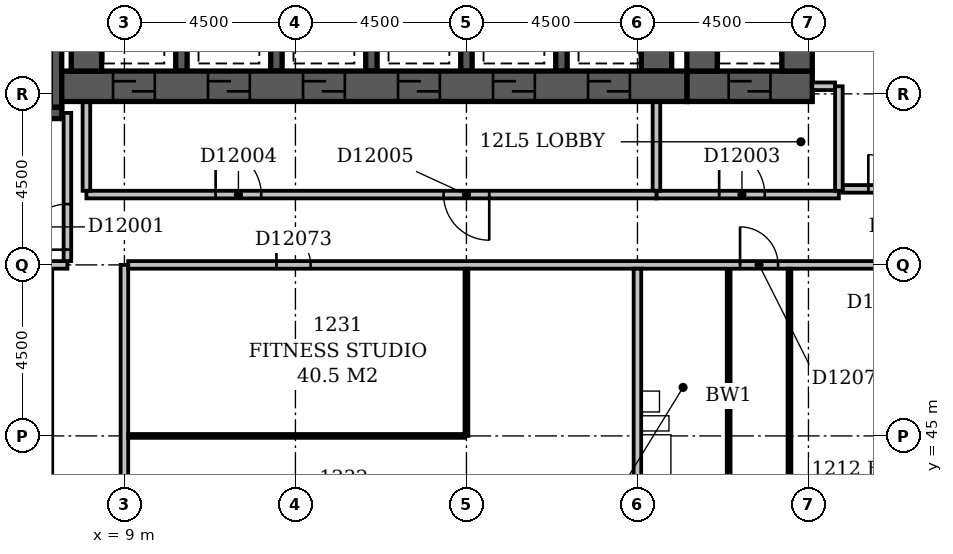
"""IFC4 building model, lengths in metres.
Left out: names, types, materials, properties, quantities, classifications, styles, units other than length and angle.
Written with IfcOpenShell. Run it as: python <this file> out.ifc"""

import sys

from ifc_helpers import new_model, si_unit, direction, frame, frame_2d, origin, place, context, subcontext, project, spatial, rectangle, extrude, element, fill, save


model = new_model("IFC4")
c1 = context("Model", 3, precision=1e-05, world=origin(), true_north=direction((0.0, 1.0)))
c2 = subcontext(c1, "Body", "Model", "MODEL_VIEW")
j1 = project(units=[si_unit("LENGTHUNIT", "METRE"), si_unit("PLANEANGLEUNIT", "RADIAN")], contexts=[c1])
p1 = place(None, origin())
s1 = spatial("IfcSite", under=j1, at=p1, CompositionType="ELEMENT")
p2 = place(p1, origin())
s2 = spatial("IfcBuilding", under=s1, at=p2, CompositionType="ELEMENT")
p3 = place(p2, frame((0.0, 0.0, 54.2)))
s3 = spatial("IfcBuildingStorey", under=s2, at=p3, CompositionType="ELEMENT", Elevation=54.2)
p4 = place(p3, frame((0.35, 53.5, -0.3), z_axis=(0.0, 0.0, 1.0), x_axis=(1.0, 0.0, 0.0)))
e1 = element("IfcWall", 1, at=p4, inside=s3, PredefinedType="SHEAR", context=c2, shape_type="SweptSolid", body=[
    extrude(rectangle(XDim=7.0, YDim=0.3, at=frame_2d((3.5, 0.0))), origin(), (0.0, 0.0, 1.0), 3.6),
])
p5 = place(p4, frame((5.58, 0.0, 0.3)))
e2 = element("IfcOpeningElement", 2, at=p5, cuts=e1, PredefinedType="OPENING", context=c2, shape_type="SweptSolid", body=[
    extrude(rectangle(XDim=1.1, YDim=2.1, at=frame_2d((0.55, 1.05))), frame((0.0, 0.162, 0.0), z_axis=(0.0, -1.0, 0.0), x_axis=(1.0, 0.0, 0.0)), (0.0, 0.0, 1.0), 0.324),
])
p6 = place(p3, frame((7.2, 53.65, -0.3), z_axis=(0.0, 0.0, 1.0), x_axis=(0.0, 1.0, 0.0)))
e3 = element("IfcWall", 3, at=p6, inside=s3, PredefinedType="SHEAR", context=c2, shape_type="SweptSolid", body=[
    extrude(rectangle(XDim=4.2, YDim=0.3, at=frame_2d((2.1, 0.0))), origin(), (0.0, 0.0, 1.0), 3.6),
])
p7 = place(p3, frame((7.35, 54.2, -0.3), z_axis=(0.0, 0.0, 1.0), x_axis=(1.0, 0.0, 0.0)))
e4 = element("IfcWall", 4, at=p7, inside=s3, PredefinedType="SHEAR", context=c2, shape_type="SweptSolid", body=[
    extrude(rectangle(XDim=16.45, YDim=0.8, at=frame_2d((8.225, 0.0))), origin(), (0.0, 0.0, 1.0), 3.6),
])
p8 = place(p7, frame((1.35, 0.0, 0.3)))
e5 = element("IfcOpeningElement", 5, at=p8, cuts=e4, PredefinedType="OPENING", context=c2, shape_type="SweptSolid", body=[
    extrude(rectangle(XDim=1.1, YDim=2.1, at=frame_2d((0.55, 1.05))), frame((0.0, 0.412, 0.0), z_axis=(0.0, -1.0, 0.0), x_axis=(1.0, 0.0, 0.0)), (0.0, 0.0, 1.0), 0.824),
])
p9 = place(p7, frame((3.85, 0.0, 0.3)))
e6 = element("IfcOpeningElement", 6, at=p9, cuts=e4, PredefinedType="OPENING", context=c2, shape_type="SweptSolid", body=[
    extrude(rectangle(XDim=1.1, YDim=2.1, at=frame_2d((0.55, 1.05))), frame((0.0, 0.412, 0.0), z_axis=(0.0, -1.0, 0.0), x_axis=(1.0, 0.0, 0.0)), (0.0, 0.0, 1.0), 0.824),
])
p10 = place(p7, frame((6.35, 0.0, 0.3)))
e7 = element("IfcOpeningElement", 7, at=p10, cuts=e4, PredefinedType="OPENING", context=c2, shape_type="SweptSolid", body=[
    extrude(rectangle(XDim=1.1, YDim=2.1, at=frame_2d((0.55, 1.05))), frame((0.0, 0.412, 0.0), z_axis=(0.0, -1.0, 0.0), x_axis=(1.0, 0.0, 0.0)), (0.0, 0.0, 1.0), 0.824),
])
p11 = place(p7, frame((8.85, 0.0, 0.3)))
e8 = element("IfcOpeningElement", 8, at=p11, cuts=e4, PredefinedType="OPENING", context=c2, shape_type="SweptSolid", body=[
    extrude(rectangle(XDim=1.1, YDim=2.1, at=frame_2d((0.55, 1.05))), frame((0.0, 0.412, 0.0), z_axis=(0.0, -1.0, 0.0), x_axis=(1.0, 0.0, 0.0)), (0.0, 0.0, 1.0), 0.824),
])
p12 = place(p7, frame((11.35, 0.0, 0.3)))
e9 = element("IfcOpeningElement", 9, at=p12, cuts=e4, PredefinedType="OPENING", context=c2, shape_type="SweptSolid", body=[
    extrude(rectangle(XDim=1.1, YDim=2.1, at=frame_2d((0.55, 1.05))), frame((0.0, 0.412, 0.0), z_axis=(0.0, -1.0, 0.0), x_axis=(1.0, 0.0, 0.0)), (0.0, 0.0, 1.0), 0.824),
])
p13 = place(p7, frame((13.85, 0.0, 0.3)))
e10 = element("IfcOpeningElement", 10, at=p13, cuts=e4, PredefinedType="OPENING", context=c2, shape_type="SweptSolid", body=[
    extrude(rectangle(XDim=1.1, YDim=2.1, at=frame_2d((0.55, 1.05))), frame((0.0, 0.412, 0.0), z_axis=(0.0, -1.0, 0.0), x_axis=(1.0, 0.0, 0.0)), (0.0, 0.0, 1.0), 0.824),
])
p14 = place(p3, frame((8.0, 54.6, -0.3), z_axis=(0.0, 0.0, 1.0), x_axis=(0.0, 1.0, 0.0)))
e11 = element("IfcWall", 11, at=p14, inside=s3, PredefinedType="SHEAR", context=c2, shape_type="SweptSolid", body=[
    extrude(rectangle(XDim=3.0, YDim=0.8, at=frame_2d((1.5, 0.0))), origin(), (0.0, 0.0, 1.0), 3.6),
])
for number, where, z_axis, x_axis in (
    (12, (10.5, 54.6, -0.3), (0.0, 0.0, 1.0), (0.0, 1.0, 0.0)),
    (13, (13.0, 54.6, -0.3), (0.0, 0.0, 1.0), (0.0, 1.0, 0.0)),
    (14, (15.5, 54.6, -0.3), (0.0, 0.0, 1.0), (0.0, 1.0, 0.0)),
    (15, (18.0, 54.6, -0.3), (0.0, 0.0, 1.0), (0.0, 1.0, 0.0)),
    (16, (20.5, 54.6, -0.3), (0.0, 0.0, 1.0), (0.0, 1.0, 0.0)),
):
    element("IfcWall", number, at=place(p3, frame(where, z_axis=z_axis, x_axis=x_axis)), inside=s3, PredefinedType="SHEAR", context=c2, shape_type="SweptSolid", body=[
        extrude(rectangle(XDim=3.0, YDim=0.3, at=frame_2d((1.5, 0.0))), origin(), (0.0, 0.0, 1.0), 3.6),
    ])
p15 = place(p3, frame((23.0, 54.6, -0.3), z_axis=(0.0, 0.0, 1.0), x_axis=(0.0, 1.0, 0.0)))
e17 = element("IfcWall", 17, at=p15, inside=s3, PredefinedType="SHEAR", context=c2, shape_type="SweptSolid", body=[
    extrude(rectangle(XDim=3.0, YDim=0.8, at=frame_2d((1.5, 0.0))), origin(), (0.0, 0.0, 1.0), 3.6),
])
p16 = place(p3, frame((23.8, 54.2, -0.3), z_axis=(0.0, 0.0, 1.0), x_axis=(1.0, 0.0, 0.0)))
e18 = element("IfcWall", 18, at=p16, inside=s3, PredefinedType="SHEAR", context=c2, shape_type="SweptSolid", body=[
    extrude(rectangle(XDim=3.3, YDim=0.8, at=frame_2d((1.65, 0.0))), origin(), (0.0, 0.0, 1.0), 3.6),
])
p17 = place(p16, frame((1.1, 0.0, 0.3)))
e19 = element("IfcOpeningElement", 19, at=p17, cuts=e18, PredefinedType="OPENING", context=c2, shape_type="SweptSolid", body=[
    extrude(rectangle(XDim=1.1, YDim=2.1, at=frame_2d((0.55, 1.05))), frame((0.0, 0.412, 0.0), z_axis=(0.0, -1.0, 0.0), x_axis=(1.0, 0.0, 0.0)), (0.0, 0.0, 1.0), 0.824),
])
for number, where, z_axis, x_axis in (
    (20, (24.2, 54.6, -0.3), (0.0, 0.0, 1.0), (0.0, 1.0, 0.0)),
    (21, (26.7, 54.6, -0.3), (0.0, 0.0, 1.0), (0.0, 1.0, 0.0)),
):
    element("IfcWall", number, at=place(p3, frame(where, z_axis=z_axis, x_axis=x_axis)), inside=s3, PredefinedType="SHEAR", context=c2, shape_type="SweptSolid", body=[
        extrude(rectangle(XDim=3.0, YDim=0.8, at=frame_2d((1.5, 0.0))), origin(), (0.0, 0.0, 1.0), 3.6),
    ])
p18 = place(p3, frame((8.0, 51.35, 0.0), z_axis=(0.0, 0.0, 1.0), x_axis=(1.0, 0.0, 0.0)))
e22 = element("IfcWall", 22, at=p18, inside=s3, PredefinedType="PARTITIONING", context=c2, shape_type="SweptSolid", body=[
    extrude(rectangle(XDim=15.0, YDim=0.2, at=frame_2d((7.5, 0.0))), origin(), (0.0, 0.0, 1.0), 3.3),
])
p19 = place(p18, frame((3.4, 0.0, 0.0)))
e23 = element("IfcOpeningElement", 23, at=p19, cuts=e22, PredefinedType="OPENING", context=c2, shape_type="SweptSolid", body=[
    extrude(rectangle(XDim=1.2, YDim=2.1, at=frame_2d((0.6, 1.05))), frame((0.0, 0.112, 0.0), z_axis=(0.0, -1.0, 0.0), x_axis=(1.0, 0.0, 0.0)), (0.0, 0.0, 1.0), 0.224),
])
p20 = place(p18, frame((9.4, 0.0, 0.0)))
e24 = element("IfcOpeningElement", 24, at=p20, cuts=e22, PredefinedType="OPENING", context=c2, shape_type="SweptSolid", body=[
    extrude(rectangle(XDim=1.2, YDim=2.1, at=frame_2d((0.6, 1.05))), frame((0.0, 0.112, 0.0), z_axis=(0.0, -1.0, 0.0), x_axis=(1.0, 0.0, 0.0)), (0.0, 0.0, 1.0), 0.224),
])
for number, where, z_axis, x_axis in (
    (25, (23.0, 51.45, 0.0), (0.0, 0.0, 1.0), (0.0, 1.0, 0.0)),
    (26, (8.0, 51.45, 0.0), (0.0, 0.0, 1.0), (0.0, 1.0, 0.0)),
):
    element("IfcWall", number, at=place(p3, frame(where, z_axis=z_axis, x_axis=x_axis)), inside=s3, PredefinedType="PARTITIONING", context=c2, shape_type="SweptSolid", body=[
        extrude(rectangle(XDim=2.33, YDim=0.2, at=frame_2d((1.165, 0.0))), origin(), (0.0, 0.0, 1.0), 3.3),
    ])
p21 = place(p3, frame((23.0, 51.35, 0.0), z_axis=(0.0, 0.0, 1.0), x_axis=(1.0, 0.0, 0.0)))
e27 = element("IfcWall", 27, at=p21, inside=s3, PredefinedType="PARTITIONING", context=c2, shape_type="SweptSolid", body=[
    extrude(rectangle(XDim=4.8, YDim=0.2, at=frame_2d((2.4, 0.0))), origin(), (0.0, 0.0, 1.0), 3.3),
])
p22 = place(p21, frame((1.65, 0.0, 0.0)))
e28 = element("IfcOpeningElement", 28, at=p22, cuts=e27, PredefinedType="OPENING", context=c2, shape_type="SweptSolid", body=[
    extrude(rectangle(XDim=1.2, YDim=2.1, at=frame_2d((0.6, 1.05))), frame((0.0, 0.112, 0.0), z_axis=(0.0, -1.0, 0.0), x_axis=(1.0, 0.0, 0.0)), (0.0, 0.0, 1.0), 0.224),
])
p23 = place(p3, frame((27.8, 51.45, 0.0), z_axis=(0.0, 0.0, 1.0), x_axis=(0.0, 1.0, 0.0)))
e29 = element("IfcWall", 29, at=p23, inside=s3, PredefinedType="PARTITIONING", context=c2, shape_type="SweptSolid", body=[
    extrude(rectangle(XDim=2.75, YDim=0.2, at=frame_2d((1.375, 0.0))), origin(), (0.0, 0.0, 1.0), 3.3),
])
p24 = place(p3, frame((27.1, 54.2, 0.0), z_axis=(0.0, 0.0, 1.0), x_axis=(1.0, 0.0, 0.0)))
e30 = element("IfcWall", 30, at=p24, inside=s3, PredefinedType="PARTITIONING", context=c2, shape_type="SweptSolid", body=[
    extrude(rectangle(XDim=0.6, YDim=0.2, at=frame_2d((0.3, 0.0))), origin(), (0.0, 0.0, 1.0), 3.3),
])
p25 = place(p3, frame((0.5, 49.5, 0.0), z_axis=(0.0, 0.0, 1.0), x_axis=(1.0, 0.0, 0.0)))
e31 = element("IfcWall", 31, at=p25, inside=s3, PredefinedType="PARTITIONING", context=c2, shape_type="SweptSolid", body=[
    extrude(rectangle(XDim=7.0, YDim=0.2, at=frame_2d((3.5, 0.0))), origin(), (0.0, 0.0, 1.0), 3.3),
])
p26 = place(p3, frame((7.5, 49.6, 0.0), z_axis=(0.0, 0.0, 1.0), x_axis=(0.0, 1.0, 0.0)))
e32 = element("IfcWall", 32, at=p26, inside=s3, PredefinedType="PARTITIONING", context=c2, shape_type="SweptSolid", body=[
    extrude(rectangle(XDim=3.9, YDim=0.2, at=frame_2d((1.95, 0.0))), origin(), (0.0, 0.0, 1.0), 3.3),
])
p27 = place(p26, frame((0.3, 0.0, 0.0)))
e33 = element("IfcOpeningElement", 33, at=p27, cuts=e32, PredefinedType="OPENING", context=c2, shape_type="SweptSolid", body=[
    extrude(rectangle(XDim=1.2, YDim=2.1, at=frame_2d((0.6, 1.05))), frame((0.0, 0.112, 0.0), z_axis=(0.0, -1.0, 0.0), x_axis=(1.0, 0.0, 0.0)), (0.0, 0.0, 1.0), 0.224),
])
p28 = place(p3, frame((9.0, 5.0, 0.0), z_axis=(0.0, 0.0, 1.0), x_axis=(0.0, 1.0, 0.0)))
e34 = element("IfcWall", 34, at=p28, inside=s3, PredefinedType="PARTITIONING", context=c2, shape_type="SweptSolid", body=[
    extrude(rectangle(XDim=44.5, YDim=0.2, at=frame_2d((22.25, 0.0))), origin(), (0.0, 0.0, 1.0), 3.3),
])
p29 = place(p28, frame((28.45, 0.0, 0.0)))
e35 = element("IfcOpeningElement", 35, at=p29, cuts=e34, PredefinedType="OPENING", context=c2, shape_type="SweptSolid", body=[
    extrude(rectangle(XDim=1.0, YDim=2.1, at=frame_2d((0.5, 1.05))), frame((0.0, 0.112, 0.0), z_axis=(0.0, -1.0, 0.0), x_axis=(1.0, 0.0, 0.0)), (0.0, 0.0, 1.0), 0.224),
])
p30 = place(p28, frame((17.8, 0.0, 0.0)))
e36 = element("IfcOpeningElement", 36, at=p30, cuts=e34, PredefinedType="OPENING", context=c2, shape_type="SweptSolid", body=[
    extrude(rectangle(XDim=1.0, YDim=2.1, at=frame_2d((0.5, 1.05))), frame((0.0, 0.112, 0.0), z_axis=(0.0, -1.0, 0.0), x_axis=(1.0, 0.0, 0.0)), (0.0, 0.0, 1.0), 0.224),
])
p31 = place(p28, frame((14.55, 0.0, 0.0)))
e37 = element("IfcOpeningElement", 37, at=p31, cuts=e34, PredefinedType="OPENING", context=c2, shape_type="SweptSolid", body=[
    extrude(rectangle(XDim=1.0, YDim=2.1, at=frame_2d((0.5, 1.05))), frame((0.0, 0.112, 0.0), z_axis=(0.0, -1.0, 0.0), x_axis=(1.0, 0.0, 0.0)), (0.0, 0.0, 1.0), 0.224),
])
p32 = place(p28, frame((11.7, 0.0, 0.0)))
e38 = element("IfcOpeningElement", 38, at=p32, cuts=e34, PredefinedType="OPENING", context=c2, shape_type="SweptSolid", body=[
    extrude(rectangle(XDim=1.0, YDim=2.1, at=frame_2d((0.5, 1.05))), frame((0.0, 0.112, 0.0), z_axis=(0.0, -1.0, 0.0), x_axis=(1.0, 0.0, 0.0)), (0.0, 0.0, 1.0), 0.224),
])
p33 = place(p28, frame((35.0, 0.0, 0.0)))
e39 = element("IfcOpeningElement", 39, at=p33, cuts=e34, PredefinedType="OPENING", context=c2, shape_type="SweptSolid", body=[
    extrude(rectangle(XDim=0.9, YDim=2.1, at=frame_2d((0.45, 1.05))), frame((0.0, 0.112, 0.0), z_axis=(0.0, -1.0, 0.0), x_axis=(1.0, 0.0, 0.0)), (0.0, 0.0, 1.0), 0.224),
])
p34 = place(p28, frame((1.5, 0.0, 0.0)))
e40 = element("IfcOpeningElement", 40, at=p34, cuts=e34, PredefinedType="OPENING", context=c2, shape_type="SweptSolid", body=[
    extrude(rectangle(XDim=0.9, YDim=2.1, at=frame_2d((0.45, 1.05))), frame((0.0, 0.112, 0.0), z_axis=(0.0, -1.0, 0.0), x_axis=(1.0, 0.0, 0.0)), (0.0, 0.0, 1.0), 0.224),
])
p35 = place(p3, frame((22.5, 36.6, 0.0), z_axis=(0.0, 0.0, 1.0), x_axis=(0.0, 1.0, 0.0)))
e41 = element("IfcWall", 41, at=p35, inside=s3, PredefinedType="PARTITIONING", context=c2, shape_type="SweptSolid", body=[
    extrude(rectangle(XDim=12.8, YDim=0.2, at=frame_2d((6.4, 0.0))), origin(), (0.0, 0.0, 1.0), 3.3),
])
p36 = place(p3, frame((24.9, 42.7, 0.0), z_axis=(0.0, 0.0, 1.0), x_axis=(0.0, 1.0, 0.0)))
e42 = element("IfcWall", 42, at=p36, inside=s3, PredefinedType="PLUMBINGWALL", context=c2, shape_type="SweptSolid", body=[
    extrude(rectangle(XDim=6.7, YDim=0.1, at=frame_2d((3.35, 0.0))), origin(), (0.0, 0.0, 1.0), 3.3),
])
p37 = place(p3, frame((26.5, 42.7, 0.0), z_axis=(0.0, 0.0, 1.0), x_axis=(0.0, 1.0, 0.0)))
e43 = element("IfcWall", 43, at=p37, inside=s3, PredefinedType="PARTITIONING", context=c2, shape_type="SweptSolid", body=[
    extrude(rectangle(XDim=6.7, YDim=0.1, at=frame_2d((3.35, 0.0))), origin(), (0.0, 0.0, 1.0), 2.6),
])
p38 = place(p3, frame((9.1, 45.0, 0.0), z_axis=(0.0, 0.0, 1.0), x_axis=(1.0, 0.0, 0.0)))
e44 = element("IfcWall", 44, at=p38, inside=s3, PredefinedType="PARTITIONING", context=c2, shape_type="SweptSolid", body=[
    extrude(rectangle(XDim=8.85, YDim=0.1, at=frame_2d((4.425, 0.0))), origin(), (0.0, 0.0, 1.0), 3.3),
])
p39 = place(p3, frame((18.0, 45.0, 0.0), z_axis=(0.0, 0.0, 1.0), x_axis=(0.0, 1.0, 0.0)))
e45 = element("IfcWall", 45, at=p39, inside=s3, PredefinedType="PARTITIONING", context=c2, shape_type="SweptSolid", body=[
    extrude(rectangle(XDim=4.4, YDim=0.1, at=frame_2d((2.2, 0.0))), origin(), (0.0, 0.0, 1.0), 3.3),
])
p40 = place(p3, frame((9.1, 49.5, 0.0), z_axis=(0.0, 0.0, 1.0), x_axis=(1.0, 0.0, 0.0)))
e46 = element("IfcWall", 46, at=p40, inside=s3, PredefinedType="PARTITIONING", context=c2, shape_type="SweptSolid", body=[
    extrude(rectangle(XDim=57.8, YDim=0.2, at=frame_2d((28.9, 0.0))), origin(), (0.0, 0.0, 1.0), 3.3),
])
p41 = place(p40, frame((16.1, 0.0, 0.0)))
e47 = element("IfcOpeningElement", 47, at=p41, cuts=e46, PredefinedType="OPENING", context=c2, shape_type="SweptSolid", body=[
    extrude(rectangle(XDim=1.0, YDim=2.1, at=frame_2d((0.5, 1.05))), frame((0.0, 0.112, 0.0), z_axis=(0.0, -1.0, 0.0), x_axis=(1.0, 0.0, 0.0)), (0.0, 0.0, 1.0), 0.224),
])
p42 = place(p40, frame((40.0, 0.0, 0.0)))
e48 = element("IfcOpeningElement", 48, at=p42, cuts=e46, PredefinedType="OPENING", context=c2, shape_type="SweptSolid", body=[
    extrude(rectangle(XDim=1.0, YDim=2.1, at=frame_2d((0.5, 1.05))), frame((0.0, 0.112, 0.0), z_axis=(0.0, -1.0, 0.0), x_axis=(1.0, 0.0, 0.0)), (0.0, 0.0, 1.0), 0.224),
])
p43 = place(p40, frame((45.2, 0.0, 0.0)))
e49 = element("IfcOpeningElement", 49, at=p43, cuts=e46, PredefinedType="OPENING", context=c2, shape_type="SweptSolid", body=[
    extrude(rectangle(XDim=1.0, YDim=2.1, at=frame_2d((0.5, 1.05))), frame((0.0, 0.112, 0.0), z_axis=(0.0, -1.0, 0.0), x_axis=(1.0, 0.0, 0.0)), (0.0, 0.0, 1.0), 0.224),
])
p44 = place(p40, frame((3.9, 0.0, 0.0)))
e50 = element("IfcOpeningElement", 50, at=p44, cuts=e46, PredefinedType="OPENING", context=c2, shape_type="SweptSolid", body=[
    extrude(rectangle(XDim=0.9, YDim=2.1, at=frame_2d((0.45, 1.05))), frame((0.0, 0.112, 0.0), z_axis=(0.0, -1.0, 0.0), x_axis=(1.0, 0.0, 0.0)), (0.0, 0.0, 1.0), 0.224),
])
p45 = place(p3, frame((27.9, 51.5, 0.0), z_axis=(0.0, 0.0, 1.0), x_axis=(1.0, 0.0, 0.0)))
e51 = element("IfcWall", 51, at=p45, inside=s3, PredefinedType="PARTITIONING", context=c2, shape_type="SweptSolid", body=[
    extrude(rectangle(XDim=9.3, YDim=0.2, at=frame_2d((4.65, 0.0))), origin(), (0.0, 0.0, 1.0), 3.3),
])
p46 = place(p45, frame((0.675, 0.0, 0.0)))
e52 = element("IfcOpeningElement", 52, at=p46, cuts=e51, PredefinedType="OPENING", context=c2, shape_type="SweptSolid", body=[
    extrude(rectangle(XDim=0.9, YDim=2.1, at=frame_2d((0.45, 1.05))), frame((0.0, 0.112, 0.0), z_axis=(0.0, -1.0, 0.0), x_axis=(1.0, 0.0, 0.0)), (0.0, 0.0, 1.0), 0.224),
])
p47 = place(p45, frame((3.6, 0.0, 0.0)))
e53 = element("IfcOpeningElement", 53, at=p47, cuts=e51, PredefinedType="OPENING", context=c2, shape_type="SweptSolid", body=[
    extrude(rectangle(XDim=1.0, YDim=2.1, at=frame_2d((0.5, 1.05))), frame((0.0, 0.112, 0.0), z_axis=(0.0, -1.0, 0.0), x_axis=(1.0, 0.0, 0.0)), (0.0, 0.0, 1.0), 0.224),
])
p48 = place(p45, frame((7.125, 0.0, 0.0)))
e54 = element("IfcOpeningElement", 54, at=p48, cuts=e51, PredefinedType="OPENING", context=c2, shape_type="SweptSolid", body=[
    extrude(rectangle(XDim=1.0, YDim=2.1, at=frame_2d((0.5, 1.05))), frame((0.0, 0.112, 0.0), z_axis=(0.0, -1.0, 0.0), x_axis=(1.0, 0.0, 0.0)), (0.0, 0.0, 1.0), 0.224),
])
p49 = place(p27, origin())
e55 = element("IfcDoor", 55, at=p49, inside=s3, OperationType="SINGLE_SWING_LEFT", PredefinedType="DOOR", context=c2, shape_type="SweptSolid", body=[
    extrude(rectangle(XDim=1.2, YDim=2.1, at=frame_2d((0.6, 1.05))), frame((0.0, 0.025, 0.0), z_axis=(0.0, -1.0, 0.0), x_axis=(1.0, 0.0, 0.0)), (0.0, 0.0, 1.0), 0.05),
])
fill(e33, e55)
p50 = place(p22, origin())
e56 = element("IfcDoor", 56, at=p50, inside=s3, OperationType="SINGLE_SWING_LEFT", PredefinedType="DOOR", context=c2, shape_type="SweptSolid", body=[
    extrude(rectangle(XDim=1.2, YDim=2.1, at=frame_2d((0.6, 1.05))), frame((0.0, 0.025, 0.0), z_axis=(0.0, -1.0, 0.0), x_axis=(1.0, 0.0, 0.0)), (0.0, 0.0, 1.0), 0.05),
])
fill(e28, e56)
p51 = place(p17, origin())
e57 = element("IfcDoor", 57, at=p51, inside=s3, OperationType="SLIDING_TO_LEFT", PredefinedType="DOOR", context=c2, shape_type="SweptSolid", body=[
    extrude(rectangle(XDim=1.1, YDim=2.1, at=frame_2d((0.55, 1.05))), frame((0.0, 0.025, 0.0), z_axis=(0.0, -1.0, 0.0), x_axis=(1.0, 0.0, 0.0)), (0.0, 0.0, 1.0), 0.05),
])
fill(e19, e57)
p52 = place(p8, origin())
e58 = element("IfcDoor", 58, at=p52, inside=s3, OperationType="SLIDING_TO_LEFT", PredefinedType="DOOR", context=c2, shape_type="SweptSolid", body=[
    extrude(rectangle(XDim=1.1, YDim=2.1, at=frame_2d((0.55, 1.05))), frame((0.0, 0.025, 0.0), z_axis=(0.0, -1.0, 0.0), x_axis=(1.0, 0.0, 0.0)), (0.0, 0.0, 1.0), 0.05),
])
fill(e5, e58)
p53 = place(p9, origin())
e59 = element("IfcDoor", 59, at=p53, inside=s3, OperationType="SLIDING_TO_LEFT", PredefinedType="DOOR", context=c2, shape_type="SweptSolid", body=[
    extrude(rectangle(XDim=1.1, YDim=2.1, at=frame_2d((0.55, 1.05))), frame((0.0, 0.025, 0.0), z_axis=(0.0, -1.0, 0.0), x_axis=(1.0, 0.0, 0.0)), (0.0, 0.0, 1.0), 0.05),
])
fill(e6, e59)
p54 = place(p10, origin())
e60 = element("IfcDoor", 60, at=p54, inside=s3, OperationType="SLIDING_TO_LEFT", PredefinedType="DOOR", context=c2, shape_type="SweptSolid", body=[
    extrude(rectangle(XDim=1.1, YDim=2.1, at=frame_2d((0.55, 1.05))), frame((0.0, 0.025, 0.0), z_axis=(0.0, -1.0, 0.0), x_axis=(1.0, 0.0, 0.0)), (0.0, 0.0, 1.0), 0.05),
])
fill(e7, e60)
p55 = place(p11, origin())
e61 = element("IfcDoor", 61, at=p55, inside=s3, OperationType="SLIDING_TO_LEFT", PredefinedType="DOOR", context=c2, shape_type="SweptSolid", body=[
    extrude(rectangle(XDim=1.1, YDim=2.1, at=frame_2d((0.55, 1.05))), frame((0.0, 0.025, 0.0), z_axis=(0.0, -1.0, 0.0), x_axis=(1.0, 0.0, 0.0)), (0.0, 0.0, 1.0), 0.05),
])
fill(e8, e61)
p56 = place(p12, origin())
e62 = element("IfcDoor", 62, at=p56, inside=s3, OperationType="SLIDING_TO_LEFT", PredefinedType="DOOR", context=c2, shape_type="SweptSolid", body=[
    extrude(rectangle(XDim=1.1, YDim=2.1, at=frame_2d((0.55, 1.05))), frame((0.0, 0.025, 0.0), z_axis=(0.0, -1.0, 0.0), x_axis=(1.0, 0.0, 0.0)), (0.0, 0.0, 1.0), 0.05),
])
fill(e9, e62)
p57 = place(p13, origin())
e63 = element("IfcDoor", 63, at=p57, inside=s3, OperationType="SLIDING_TO_LEFT", PredefinedType="DOOR", context=c2, shape_type="SweptSolid", body=[
    extrude(rectangle(XDim=1.1, YDim=2.1, at=frame_2d((0.55, 1.05))), frame((0.0, 0.025, 0.0), z_axis=(0.0, -1.0, 0.0), x_axis=(1.0, 0.0, 0.0)), (0.0, 0.0, 1.0), 0.05),
])
fill(e10, e63)
p58 = place(p19, origin())
e64 = element("IfcDoor", 64, at=p58, inside=s3, OperationType="SINGLE_SWING_LEFT", PredefinedType="DOOR", context=c2, shape_type="SweptSolid", body=[
    extrude(rectangle(XDim=1.2, YDim=2.1, at=frame_2d((0.6, 1.05))), frame((0.0, 0.025, 0.0), z_axis=(0.0, -1.0, 0.0), x_axis=(1.0, 0.0, 0.0)), (0.0, 0.0, 1.0), 0.05),
])
fill(e23, e64)
p59 = place(p20, origin())
e65 = element("IfcDoor", 65, at=p59, inside=s3, OperationType="SINGLE_SWING_RIGHT", PredefinedType="DOOR", context=c2, shape_type="SweptSolid", body=[
    extrude(rectangle(XDim=1.2, YDim=2.1, at=frame_2d((0.6, 1.05))), frame((0.0, 0.025, 0.0), z_axis=(0.0, -1.0, 0.0), x_axis=(1.0, 0.0, 0.0)), (0.0, 0.0, 1.0), 0.05),
])
fill(e24, e65)
p60 = place(p41, origin())
e66 = element("IfcDoor", 66, at=p60, inside=s3, OperationType="SINGLE_SWING_LEFT", PredefinedType="DOOR", context=c2, shape_type="SweptSolid", body=[
    extrude(rectangle(XDim=1.0, YDim=2.1, at=frame_2d((0.5, 1.05))), frame((0.0, 0.025, 0.0), z_axis=(0.0, -1.0, 0.0), x_axis=(1.0, 0.0, 0.0)), (0.0, 0.0, 1.0), 0.05),
])
fill(e47, e66)
p61 = place(p44, origin())
e67 = element("IfcDoor", 67, at=p61, inside=s3, OperationType="SINGLE_SWING_LEFT", PredefinedType="DOOR", context=c2, shape_type="SweptSolid", body=[
    extrude(rectangle(XDim=0.9, YDim=2.1, at=frame_2d((0.45, 1.05))), frame((0.0, 0.025, 0.0), z_axis=(0.0, -1.0, 0.0), x_axis=(1.0, 0.0, 0.0)), (0.0, 0.0, 1.0), 0.05),
])
fill(e50, e67)
p62 = place(p46, origin())
e68 = element("IfcDoor", 68, at=p62, inside=s3, OperationType="SINGLE_SWING_LEFT", PredefinedType="DOOR", context=c2, shape_type="SweptSolid", body=[
    extrude(rectangle(XDim=0.9, YDim=2.1, at=frame_2d((0.45, 1.05))), frame((0.0, 0.025, 0.0), z_axis=(0.0, -1.0, 0.0), x_axis=(1.0, 0.0, 0.0)), (0.0, 0.0, 1.0), 0.05),
])
fill(e52, e68)
save(model, sys.argv[1])
